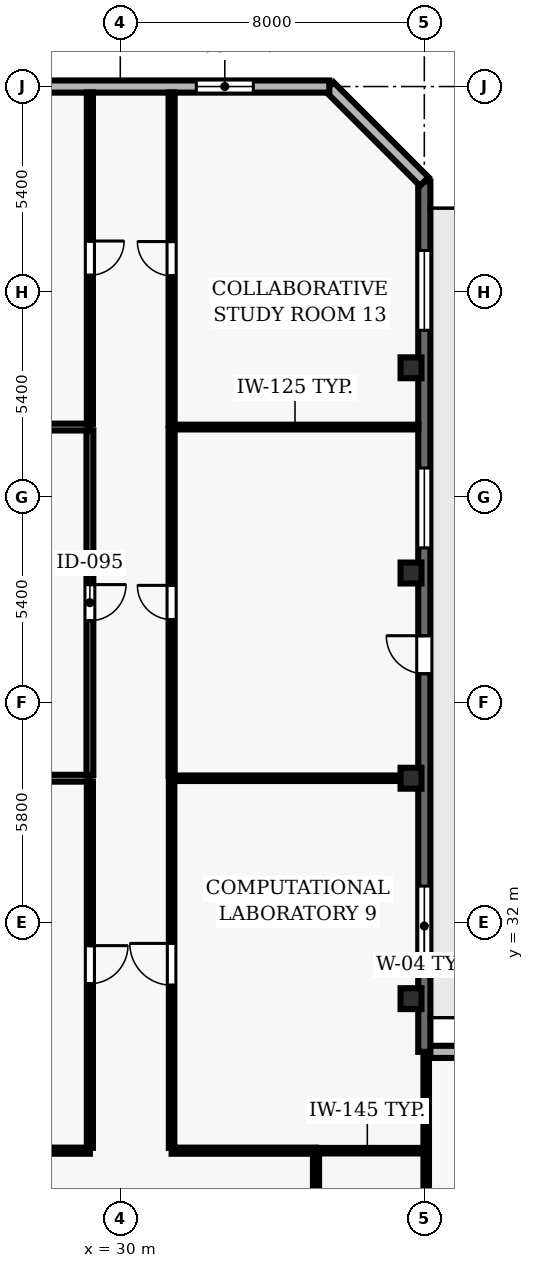
"""IFC4 building model, lengths in metres.
Left out: names, types, materials, properties, quantities, classifications, styles, units other than length and angle.
Written with IfcOpenShell. Run it as: python <this file> out.ifc"""

import sys

from ifc_helpers import new_model, si_unit, direction, frame, frame_2d, origin, origin_2d, place, context, subcontext, project, spatial, rectangle, hollow_rectangle, extrude, element, fill, save


model = new_model("IFC4")
c1 = context("Model", 3, precision=1e-05, world=origin(), true_north=direction((0.0, 1.0)))
c2 = subcontext(c1, "Body", "Model", "MODEL_VIEW")
j1 = project(units=[si_unit("LENGTHUNIT", "METRE"), si_unit("PLANEANGLEUNIT", "RADIAN")], contexts=[c1])
p1 = place(None, origin())
s1 = spatial("IfcSite", under=j1, at=p1, CompositionType="ELEMENT")
p2 = place(p1, origin())
s2 = spatial("IfcBuilding", under=s1, at=p2, CompositionType="ELEMENT")
p3 = place(p2, frame((0.0, 0.0, 34.9)))
s3 = spatial("IfcBuildingStorey", under=s2, at=p3, CompositionType="ELEMENT", Elevation=34.9)
for number, where, z_axis, x_axis in (
    (1, (37.65, 30.0, 0.0), (0.0, 0.0, 1.0), (1.0, 0.0, 0.0)),
    (2, (37.65, 35.8, 0.0), (0.0, 0.0, 1.0), (1.0, 0.0, 0.0)),
    (3, (37.65, 41.2, 0.0), (0.0, 0.0, 1.0), (1.0, 0.0, 0.0)),
    (4, (37.65, 46.6, 0.0), (0.0, 0.0, 1.0), (1.0, 0.0, 0.0)),
):
    element("IfcColumn", number, at=place(p3, frame(where, z_axis=z_axis, x_axis=x_axis)), inside=s3, PredefinedType="COLUMN", context=c2, shape_type="SweptSolid", body=[
        extrude(hollow_rectangle(XDim=0.55, YDim=0.55, WallThickness=0.025, at=origin_2d()), origin(), (0.0, 0.0, 1.0), 3.9),
    ])
p4 = place(p3, frame((54.3, 28.6, 0.0), z_axis=(0.0, 0.0, 1.0), x_axis=(-1.0, 0.0, 0.0)))
e5 = element("IfcWall", 5, at=p4, inside=s3, PredefinedType="SOLIDWALL", context=c2, shape_type="SweptSolid", body=[
    extrude(rectangle(XDim=16.3, YDim=0.32, at=frame_2d((8.15, 0.0))), origin(), (0.0, 0.0, 1.0), 3.69),
])
p5 = place(p4, frame((1.817, 0.0, 0.9)))
e6 = element("IfcOpeningElement", 6, at=p5, cuts=e5, PredefinedType="OPENING", context=c2, shape_type="SweptSolid", body=[
    extrude(rectangle(XDim=1.8, YDim=1.6, at=frame_2d((0.9, 0.8))), frame((0.0, 0.17, 0.0), z_axis=(0.0, -1.0, 0.0), x_axis=(1.0, 0.0, 0.0)), (0.0, 0.0, 1.0), 0.34),
])
p6 = place(p4, frame((7.25, 0.0, 0.9)))
e7 = element("IfcOpeningElement", 7, at=p6, cuts=e5, PredefinedType="OPENING", context=c2, shape_type="SweptSolid", body=[
    extrude(rectangle(XDim=1.8, YDim=1.6, at=frame_2d((0.9, 0.8))), frame((0.0, 0.17, 0.0), z_axis=(0.0, -1.0, 0.0), x_axis=(1.0, 0.0, 0.0)), (0.0, 0.0, 1.0), 0.34),
])
p7 = place(p4, frame((12.683, 0.0, 0.9)))
e8 = element("IfcOpeningElement", 8, at=p7, cuts=e5, PredefinedType="OPENING", context=c2, shape_type="SweptSolid", body=[
    extrude(rectangle(XDim=1.8, YDim=1.6, at=frame_2d((0.9, 0.8))), frame((0.0, 0.17, 0.0), z_axis=(0.0, -1.0, 0.0), x_axis=(1.0, 0.0, 0.0)), (0.0, 0.0, 1.0), 0.34),
])
p8 = place(p3, frame((38.0, 28.6, 0.0), z_axis=(0.0, 0.0, 1.0), x_axis=(0.0, 1.0, 0.0)))
e9 = element("IfcWall", 9, at=p8, inside=s3, PredefinedType="SOLIDWALL", context=c2, shape_type="SweptSolid", body=[
    extrude(rectangle(XDim=22.9, YDim=0.32, at=frame_2d((11.45, 0.0))), origin(), (0.0, 0.0, 1.0), 3.69),
])
p9 = place(p8, frame((9.95, 0.0, 0.0)))
e10 = element("IfcOpeningElement", 10, at=p9, cuts=e9, PredefinedType="OPENING", context=c2, shape_type="SweptSolid", body=[
    extrude(rectangle(XDim=1.0, YDim=2.2, at=frame_2d((0.5, 1.1))), frame((0.0, 0.17, 0.0), z_axis=(0.0, -1.0, 0.0), x_axis=(1.0, 0.0, 0.0)), (0.0, 0.0, 1.0), 0.34),
])
p10 = place(p8, frame((2.262, 0.0, 0.9)))
e11 = element("IfcOpeningElement", 11, at=p10, cuts=e9, PredefinedType="OPENING", context=c2, shape_type="SweptSolid", body=[
    extrude(rectangle(XDim=2.1, YDim=1.6, at=frame_2d((1.05, 0.8))), frame((0.0, 0.17, 0.0), z_axis=(0.0, -1.0, 0.0), x_axis=(1.0, 0.0, 0.0)), (0.0, 0.0, 1.0), 0.34),
])
p11 = place(p8, frame((13.262, 0.0, 0.9)))
e12 = element("IfcOpeningElement", 12, at=p11, cuts=e9, PredefinedType="OPENING", context=c2, shape_type="SweptSolid", body=[
    extrude(rectangle(XDim=2.1, YDim=1.6, at=frame_2d((1.05, 0.8))), frame((0.0, 0.17, 0.0), z_axis=(0.0, -1.0, 0.0), x_axis=(1.0, 0.0, 0.0)), (0.0, 0.0, 1.0), 0.34),
])
p12 = place(p8, frame((18.987, 0.0, 0.9)))
e13 = element("IfcOpeningElement", 13, at=p12, cuts=e9, PredefinedType="OPENING", context=c2, shape_type="SweptSolid", body=[
    extrude(rectangle(XDim=2.1, YDim=1.6, at=frame_2d((1.05, 0.8))), frame((0.0, 0.17, 0.0), z_axis=(0.0, -1.0, 0.0), x_axis=(1.0, 0.0, 0.0)), (0.0, 0.0, 1.0), 0.34),
])
p13 = place(p3, frame((38.0, 51.5, 0.0), z_axis=(0.0, 0.0, 1.0), x_axis=(-0.707106781187, 0.707106781187, 0.0)))
e14 = element("IfcWall", 14, at=p13, inside=s3, PredefinedType="SOLIDWALL", context=c2, shape_type="SweptSolid", body=[
    extrude(rectangle(XDim=3.536, YDim=0.32, at=frame_2d((1.768, 0.0))), origin(), (0.0, 0.0, 1.0), 3.69),
])
p14 = place(p3, frame((35.5, 54.0, 0.0), z_axis=(0.0, 0.0, 1.0), x_axis=(-1.0, 0.0, 0.0)))
e15 = element("IfcWall", 15, at=p14, inside=s3, PredefinedType="SOLIDWALL", context=c2, shape_type="SweptSolid", body=[
    extrude(rectangle(XDim=11.0, YDim=0.32, at=frame_2d((5.5, 0.0))), origin(), (0.0, 0.0, 1.0), 3.69),
])
p15 = place(p14, frame((2.0, 0.0, 0.9)))
e16 = element("IfcOpeningElement", 16, at=p15, cuts=e15, PredefinedType="OPENING", context=c2, shape_type="SweptSolid", body=[
    extrude(rectangle(XDim=1.5, YDim=1.8, at=frame_2d((0.75, 0.9))), frame((0.0, 0.17, 0.0), z_axis=(0.0, -1.0, 0.0), x_axis=(1.0, 0.0, 0.0)), (0.0, 0.0, 1.0), 0.34),
])
p16 = place(p14, frame((7.5, 0.0, 0.9)))
e17 = element("IfcOpeningElement", 17, at=p16, cuts=e15, PredefinedType="OPENING", context=c2, shape_type="SweptSolid", body=[
    extrude(rectangle(XDim=1.5, YDim=1.8, at=frame_2d((0.75, 0.9))), frame((0.0, 0.17, 0.0), z_axis=(0.0, -1.0, 0.0), x_axis=(1.0, 0.0, 0.0)), (0.0, 0.0, 1.0), 0.34),
])
p17 = place(p3, frame((29.2, 26.0, 0.0), z_axis=(0.0, 0.0, 1.0), x_axis=(-1.0, 0.0, 0.0)))
e18 = element("IfcWall", 18, at=p17, inside=s3, PredefinedType="PARTITIONING", context=c2, shape_type="SweptSolid", body=[
    extrude(rectangle(XDim=7.045, YDim=0.16, at=frame_2d((3.522, 0.0))), origin(), (0.0, 0.0, 1.0), 3.69),
])
p18 = place(p3, frame((29.2, 35.8, 0.0), z_axis=(0.0, 0.0, 1.0), x_axis=(-1.0, 0.0, 0.0)))
e19 = element("IfcWall", 19, at=p18, inside=s3, PredefinedType="PARTITIONING", context=c2, shape_type="SweptSolid", body=[
    extrude(rectangle(XDim=7.045, YDim=0.18, at=frame_2d((3.522, 0.0))), origin(), (0.0, 0.0, 1.0), 3.055),
])
p19 = place(p3, frame((29.2, 45.04, 0.0), z_axis=(0.0, 0.0, 1.0), x_axis=(-1.0, 0.0, 0.0)))
e20 = element("IfcWall", 20, at=p19, inside=s3, PredefinedType="PARTITIONING", context=c2, shape_type="SweptSolid", body=[
    extrude(rectangle(XDim=7.045, YDim=0.18, at=frame_2d((3.522, 0.0))), origin(), (0.0, 0.0, 1.0), 3.69),
])
p20 = place(p3, frame((35.15, 26.0, 0.0), z_axis=(0.0, 0.0, 1.0), x_axis=(-1.0, 0.0, 0.0)))
e21 = element("IfcWall", 21, at=p20, inside=s3, PredefinedType="PARTITIONING", context=c2, shape_type="SweptSolid", body=[
    extrude(rectangle(XDim=3.8, YDim=0.16, at=frame_2d((1.9, 0.0))), origin(), (0.0, 0.0, 1.0), 3.69),
])
p21 = place(p3, frame((35.15, 26.0, 0.0), z_axis=(0.0, 0.0, 1.0), x_axis=(1.0, 0.0, 0.0)))
e22 = element("IfcWall", 22, at=p21, inside=s3, PredefinedType="PARTITIONING", context=c2, shape_type="SweptSolid", body=[
    extrude(rectangle(XDim=2.7, YDim=0.145, at=frame_2d((1.35, 0.0))), origin(), (0.0, 0.0, 1.0), 3.69),
])
p22 = place(p3, frame((37.845, 35.8, 0.0), z_axis=(0.0, 0.0, 1.0), x_axis=(-1.0, 0.0, 0.0)))
e23 = element("IfcWall", 23, at=p22, inside=s3, PredefinedType="PARTITIONING", context=c2, shape_type="SweptSolid", body=[
    extrude(rectangle(XDim=6.495, YDim=0.145, at=frame_2d((3.248, 0.0))), origin(), (0.0, 0.0, 1.0), 3.055),
])
p23 = place(p3, frame((37.845, 45.04, 0.0), z_axis=(0.0, 0.0, 1.0), x_axis=(-1.0, 0.0, 0.0)))
e24 = element("IfcWall", 24, at=p23, inside=s3, PredefinedType="PARTITIONING", context=c2, shape_type="SweptSolid", body=[
    extrude(rectangle(XDim=6.495, YDim=0.125, at=frame_2d((3.248, 0.0))), origin(), (0.0, 0.0, 1.0), 3.69),
])
p24 = place(p3, frame((29.2, 35.715, 0.0), z_axis=(0.0, 0.0, 1.0), x_axis=(0.0, -1.0, 0.0)))
e25 = element("IfcWall", 25, at=p24, inside=s3, PredefinedType="PARTITIONING", context=c2, shape_type="SweptSolid", body=[
    extrude(rectangle(XDim=9.64, YDim=0.16, at=frame_2d((4.82, 0.0))), origin(), (0.0, 0.0, 1.0), 3.69),
])
p25 = place(p24, frame((4.32, 0.0, 0.0)))
e26 = element("IfcOpeningElement", 26, at=p25, cuts=e25, PredefinedType="OPENING", context=c2, shape_type="SweptSolid", body=[
    extrude(rectangle(XDim=1.0, YDim=2.1, at=frame_2d((0.5, 1.05))), frame((0.0, 0.09, 0.0), z_axis=(0.0, -1.0, 0.0), x_axis=(1.0, 0.0, 0.0)), (0.0, 0.0, 1.0), 0.18),
])
p26 = place(p3, frame((29.2, 44.955, 0.0), z_axis=(0.0, 0.0, 1.0), x_axis=(0.0, -1.0, 0.0)))
e27 = element("IfcWall", 27, at=p26, inside=s3, PredefinedType="PARTITIONING", context=c2, shape_type="SweptSolid", body=[
    extrude(rectangle(XDim=9.07, YDim=0.18, at=frame_2d((4.535, 0.0))), origin(), (0.0, 0.0, 1.0), 3.69),
])
p27 = place(p26, frame((4.06, 0.0, 0.0)))
e28 = element("IfcOpeningElement", 28, at=p27, cuts=e27, PredefinedType="OPENING", context=c2, shape_type="SweptSolid", body=[
    extrude(rectangle(XDim=0.95, YDim=2.1, at=frame_2d((0.475, 1.05))), frame((0.0, 0.1, 0.0), z_axis=(0.0, -1.0, 0.0), x_axis=(1.0, 0.0, 0.0)), (0.0, 0.0, 1.0), 0.2),
])
p28 = place(p3, frame((29.2, 53.845, 0.0), z_axis=(0.0, 0.0, 1.0), x_axis=(0.0, -1.0, 0.0)))
e29 = element("IfcWall", 29, at=p28, inside=s3, PredefinedType="PARTITIONING", context=c2, shape_type="SweptSolid", body=[
    extrude(rectangle(XDim=8.72, YDim=0.16, at=frame_2d((4.36, 0.0))), origin(), (0.0, 0.0, 1.0), 3.69),
])
p29 = place(p28, frame((3.91, 0.0, 0.0)))
e30 = element("IfcOpeningElement", 30, at=p29, cuts=e29, PredefinedType="OPENING", context=c2, shape_type="SweptSolid", body=[
    extrude(rectangle(XDim=0.9, YDim=2.1, at=frame_2d((0.45, 1.05))), frame((0.0, 0.09, 0.0), z_axis=(0.0, -1.0, 0.0), x_axis=(1.0, 0.0, 0.0)), (0.0, 0.0, 1.0), 0.18),
])
p30 = place(p3, frame((31.35, 26.075, 0.0), z_axis=(0.0, 0.0, 1.0), x_axis=(0.0, 1.0, 0.0)))
e31 = element("IfcWall", 31, at=p30, inside=s3, PredefinedType="PARTITIONING", context=c2, shape_type="SweptSolid", body=[
    extrude(rectangle(XDim=9.657, YDim=0.145, at=frame_2d((4.829, 0.0))), origin(), (0.0, 0.0, 1.0), 3.69),
])
p31 = place(p30, frame((4.279, 0.0, 0.0)))
e32 = element("IfcOpeningElement", 32, at=p31, cuts=e31, PredefinedType="OPENING", context=c2, shape_type="SweptSolid", body=[
    extrude(rectangle(XDim=1.1, YDim=2.15, at=frame_2d((0.55, 1.075))), frame((0.0, 0.083, 0.0), z_axis=(0.0, -1.0, 0.0), x_axis=(1.0, 0.0, 0.0)), (0.0, 0.0, 1.0), 0.165),
])
p32 = place(p3, frame((31.35, 35.867, 0.0), z_axis=(0.0, 0.0, 1.0), x_axis=(0.0, 1.0, 0.0)))
e33 = element("IfcWall", 33, at=p32, inside=s3, PredefinedType="PARTITIONING", context=c2, shape_type="SweptSolid", body=[
    extrude(rectangle(XDim=9.116, YDim=0.16, at=frame_2d((4.558, 0.0))), origin(), (0.0, 0.0, 1.0), 3.69),
])
p33 = place(p32, frame((4.108, 0.0, 0.0)))
e34 = element("IfcOpeningElement", 34, at=p33, cuts=e33, PredefinedType="OPENING", context=c2, shape_type="SweptSolid", body=[
    extrude(rectangle(XDim=0.9, YDim=2.1, at=frame_2d((0.45, 1.05))), frame((0.0, 0.09, 0.0), z_axis=(0.0, -1.0, 0.0), x_axis=(1.0, 0.0, 0.0)), (0.0, 0.0, 1.0), 0.18),
])
p34 = place(p3, frame((31.35, 45.097, 0.0), z_axis=(0.0, 0.0, 1.0), x_axis=(0.0, 1.0, 0.0)))
e35 = element("IfcWall", 35, at=p34, inside=s3, PredefinedType="PARTITIONING", context=c2, shape_type="SweptSolid", body=[
    extrude(rectangle(XDim=8.748, YDim=0.16, at=frame_2d((4.374, 0.0))), origin(), (0.0, 0.0, 1.0), 3.69),
])
p35 = place(p34, frame((3.924, 0.0, 0.0)))
e36 = element("IfcOpeningElement", 36, at=p35, cuts=e35, PredefinedType="OPENING", context=c2, shape_type="SweptSolid", body=[
    extrude(rectangle(XDim=0.9, YDim=2.1, at=frame_2d((0.45, 1.05))), frame((0.0, 0.09, 0.0), z_axis=(0.0, -1.0, 0.0), x_axis=(1.0, 0.0, 0.0)), (0.0, 0.0, 1.0), 0.18),
])
p36 = place(p3, frame((35.15, 24.07, 0.0), z_axis=(0.0, 0.0, 1.0), x_axis=(0.0, 1.0, 0.0)))
e37 = element("IfcWall", 37, at=p36, inside=s3, PredefinedType="PARTITIONING", context=c2, shape_type="SweptSolid", body=[
    extrude(rectangle(XDim=1.855, YDim=0.16, at=frame_2d((0.927, 0.0))), origin(), (0.0, 0.0, 1.0), 3.69),
])
p37 = place(p3, frame((38.05, 28.445, 0.0), z_axis=(0.0, 0.0, 1.0), x_axis=(0.0, -1.0, 0.0)))
e38 = element("IfcWall", 38, at=p37, inside=s3, PredefinedType="PARTITIONING", context=c2, shape_type="SweptSolid", body=[
    extrude(rectangle(XDim=4.395, YDim=0.145, at=frame_2d((2.198, 0.0))), origin(), (0.0, 0.0, 1.0), 3.055),
])
p38 = place(p9, origin())
e39 = element("IfcDoor", 39, at=p38, inside=s3, OperationType="SINGLE_SWING_RIGHT", PredefinedType="DOOR", context=c2, shape_type="SweptSolid", body=[
    extrude(rectangle(XDim=1.0, YDim=2.2, at=frame_2d((0.5, 1.1))), frame((0.0, 0.025, 0.0), z_axis=(0.0, -1.0, 0.0), x_axis=(1.0, 0.0, 0.0)), (0.0, 0.0, 1.0), 0.05),
])
fill(e10, e39)
p39 = place(p10, origin())
e40 = element("IfcWindow", 40, at=p39, inside=s3, PartitioningType="SINGLE_PANEL", PredefinedType="WINDOW", context=c2, shape_type="SweptSolid", body=[
    extrude(rectangle(XDim=2.1, YDim=1.6, at=frame_2d((1.05, 0.8))), frame((0.0, 0.03, 0.0), z_axis=(0.0, -1.0, 0.0), x_axis=(1.0, 0.0, 0.0)), (0.0, 0.0, 1.0), 0.06),
])
fill(e11, e40)
p40 = place(p11, origin())
e41 = element("IfcWindow", 41, at=p40, inside=s3, PartitioningType="SINGLE_PANEL", PredefinedType="WINDOW", context=c2, shape_type="SweptSolid", body=[
    extrude(rectangle(XDim=2.1, YDim=1.6, at=frame_2d((1.05, 0.8))), frame((0.0, 0.03, 0.0), z_axis=(0.0, -1.0, 0.0), x_axis=(1.0, 0.0, 0.0)), (0.0, 0.0, 1.0), 0.06),
])
fill(e12, e41)
p41 = place(p12, origin())
e42 = element("IfcWindow", 42, at=p41, inside=s3, PartitioningType="SINGLE_PANEL", PredefinedType="WINDOW", context=c2, shape_type="SweptSolid", body=[
    extrude(rectangle(XDim=2.1, YDim=1.6, at=frame_2d((1.05, 0.8))), frame((0.0, 0.03, 0.0), z_axis=(0.0, -1.0, 0.0), x_axis=(1.0, 0.0, 0.0)), (0.0, 0.0, 1.0), 0.06),
])
fill(e13, e42)
p42 = place(p15, origin())
e43 = element("IfcWindow", 43, at=p42, inside=s3, PartitioningType="SINGLE_PANEL", PredefinedType="WINDOW", context=c2, shape_type="SweptSolid", body=[
    extrude(rectangle(XDim=1.5, YDim=1.8, at=frame_2d((0.75, 0.9))), frame((0.0, 0.03, 0.0), z_axis=(0.0, -1.0, 0.0), x_axis=(1.0, 0.0, 0.0)), (0.0, 0.0, 1.0), 0.06),
])
fill(e16, e43)
p43 = place(p25, origin())
e44 = element("IfcDoor", 44, at=p43, inside=s3, OperationType="SINGLE_SWING_LEFT", PredefinedType="DOOR", context=c2, shape_type="SweptSolid", body=[
    extrude(rectangle(XDim=1.0, YDim=2.1, at=frame_2d((0.5, 1.05))), frame((0.0, 0.025, 0.0), z_axis=(0.0, -1.0, 0.0), x_axis=(1.0, 0.0, 0.0)), (0.0, 0.0, 1.0), 0.05),
])
fill(e26, e44)
p44 = place(p31, origin())
e45 = element("IfcDoor", 45, at=p44, inside=s3, OperationType="SINGLE_SWING_RIGHT", PredefinedType="DOOR", context=c2, shape_type="SweptSolid", body=[
    extrude(rectangle(XDim=1.1, YDim=2.15, at=frame_2d((0.55, 1.075))), frame((0.0, 0.025, 0.0), z_axis=(0.0, -1.0, 0.0), x_axis=(1.0, 0.0, 0.0)), (0.0, 0.0, 1.0), 0.05),
])
fill(e32, e45)
p45 = place(p27, origin())
e46 = element("IfcDoor", 46, at=p45, inside=s3, OperationType="SINGLE_SWING_LEFT", PredefinedType="DOOR", context=c2, shape_type="SweptSolid", body=[
    extrude(rectangle(XDim=0.95, YDim=2.1, at=frame_2d((0.475, 1.05))), frame((0.0, 0.025, 0.0), z_axis=(0.0, -1.0, 0.0), x_axis=(1.0, 0.0, 0.0)), (0.0, 0.0, 1.0), 0.05),
])
fill(e28, e46)
p46 = place(p33, origin())
e47 = element("IfcDoor", 47, at=p46, inside=s3, OperationType="SINGLE_SWING_RIGHT", PredefinedType="DOOR", context=c2, shape_type="SweptSolid", body=[
    extrude(rectangle(XDim=0.9, YDim=2.1, at=frame_2d((0.45, 1.05))), frame((0.0, 0.025, 0.0), z_axis=(0.0, -1.0, 0.0), x_axis=(1.0, 0.0, 0.0)), (0.0, 0.0, 1.0), 0.05),
])
fill(e34, e47)
p47 = place(p29, origin())
e48 = element("IfcDoor", 48, at=p47, inside=s3, OperationType="SINGLE_SWING_LEFT", PredefinedType="DOOR", context=c2, shape_type="SweptSolid", body=[
    extrude(rectangle(XDim=0.9, YDim=2.1, at=frame_2d((0.45, 1.05))), frame((0.0, 0.025, 0.0), z_axis=(0.0, -1.0, 0.0), x_axis=(1.0, 0.0, 0.0)), (0.0, 0.0, 1.0), 0.05),
])
fill(e30, e48)
p48 = place(p35, origin())
e49 = element("IfcDoor", 49, at=p48, inside=s3, OperationType="SINGLE_SWING_RIGHT", PredefinedType="DOOR", context=c2, shape_type="SweptSolid", body=[
    extrude(rectangle(XDim=0.9, YDim=2.1, at=frame_2d((0.45, 1.05))), frame((0.0, 0.025, 0.0), z_axis=(0.0, -1.0, 0.0), x_axis=(1.0, 0.0, 0.0)), (0.0, 0.0, 1.0), 0.05),
])
fill(e36, e49)
save(model, sys.argv[1])
